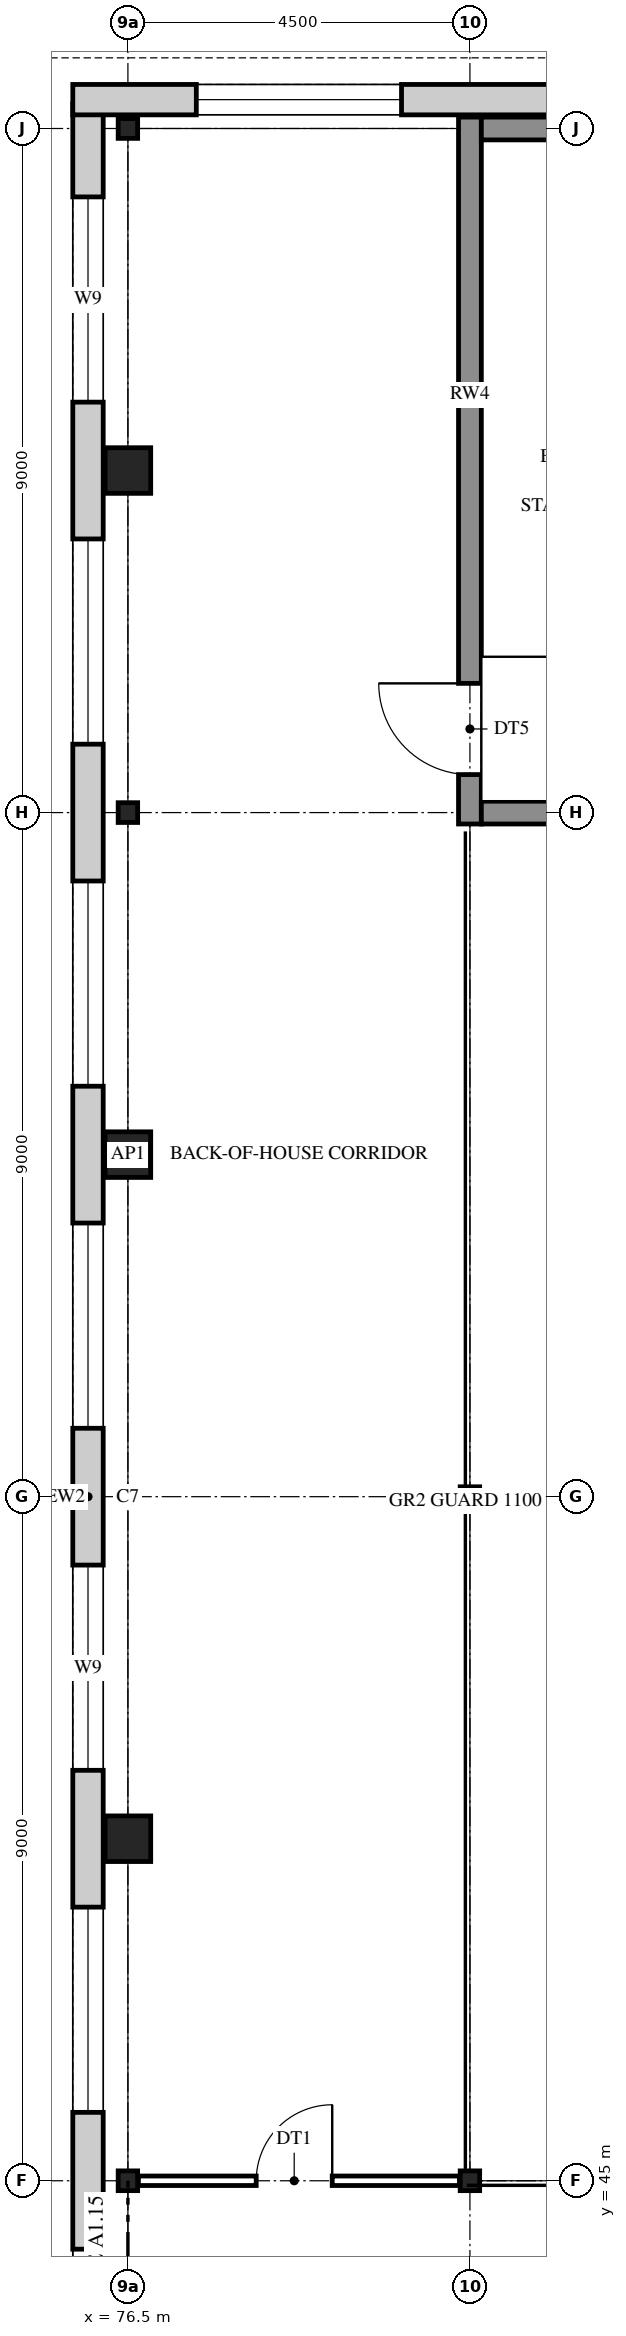
"""IFC4 building model, lengths in metres.
Left out: names, types, materials, properties, quantities, classifications, styles, units other than length and angle.
Written with IfcOpenShell. Run it as: python <this file> out.ifc"""

import sys

from ifc_helpers import new_model, si_unit, direction, frame, frame_2d, origin, origin_2d, place, context, subcontext, project, spatial, rectangle, i_section, extrude, element, fill, save


model = new_model("IFC4")
c1 = context("Model", 3, precision=1e-05, world=origin(), true_north=direction((0.0, 1.0)))
c2 = subcontext(c1, "Body", "Model", "MODEL_VIEW")
j1 = project(units=[si_unit("LENGTHUNIT", "METRE"), si_unit("PLANEANGLEUNIT", "RADIAN")], contexts=[c1])
p1 = place(None, origin())
s1 = spatial("IfcSite", under=j1, at=p1, CompositionType="ELEMENT")
p2 = place(p1, origin())
s2 = spatial("IfcBuilding", under=s1, at=p2, CompositionType="ELEMENT")
p3 = place(p2, frame((0.0, 0.0, 10.5)))
s3 = spatial("IfcBuildingStorey", under=s2, at=p3, CompositionType="ELEMENT", Elevation=10.5)
for number, where, z_axis, x_axis in (
    (1, (76.5, 45.0, 0.0), (0.0, 0.0, 1.0), (1.0, 0.0, 0.0)),
    (2, (76.5, 54.0, 0.0), (0.0, 0.0, 1.0), (1.0, 0.0, 0.0)),
    (3, (76.5, 63.0, 0.0), (0.0, 0.0, 1.0), (1.0, 0.0, 0.0)),
    (4, (76.5, 72.0, 0.0), (0.0, 0.0, 1.0), (1.0, 0.0, 0.0)),
    (5, (81.0, 45.0, 0.0), (0.0, 0.0, 1.0), (1.0, 0.0, 0.0)),
    (6, (81.0, 54.0, 0.0), (0.0, 0.0, 1.0), (1.0, 0.0, 0.0)),
):
    element("IfcColumn", number, at=place(p3, frame(where, z_axis=z_axis, x_axis=x_axis)), inside=s3, PredefinedType="COLUMN", context=c2, shape_type="SweptSolid", body=[
        extrude(i_section(OverallWidth=0.256, OverallDepth=0.26, WebThickness=0.01, FlangeThickness=0.017, FilletRadius=0.014, at=origin_2d()), origin(), (0.0, 0.0, 1.0), 4.5),
    ])
p4 = place(p3, frame((81.0, 62.85, 0.0), z_axis=(0.0, 0.0, 1.0), x_axis=(0.0, 1.0, 0.0)))
e7 = element("IfcWall", 7, at=p4, inside=s3, PredefinedType="SHEAR", context=c2, shape_type="SweptSolid", body=[
    extrude(rectangle(XDim=9.3, YDim=0.3, at=frame_2d((4.65, 0.0))), origin(), (0.0, 0.0, 1.0), 4.5),
])
p5 = place(p4, frame((0.65, 0.0, 0.0)))
e8 = element("IfcOpeningElement", 8, at=p5, cuts=e7, PredefinedType="OPENING", context=c2, shape_type="SweptSolid", body=[
    extrude(rectangle(XDim=1.2, YDim=2.1, at=frame_2d((0.6, 1.05))), frame((0.0, 0.16, 0.0), z_axis=(0.0, -1.0, 0.0), x_axis=(1.0, 0.0, 0.0)), (0.0, 0.0, 1.0), 0.32),
])
for number, where, z_axis, x_axis in (
    (9, (81.15, 63.0, 0.0), (0.0, 0.0, 1.0), (1.0, 0.0, 0.0)),
    (10, (81.15, 72.0, 0.0), (0.0, 0.0, 1.0), (1.0, 0.0, 0.0)),
):
    element("IfcWall", number, at=place(p3, frame(where, z_axis=z_axis, x_axis=x_axis)), inside=s3, PredefinedType="SHEAR", context=c2, shape_type="SweptSolid", body=[
        extrude(rectangle(XDim=4.2, YDim=0.3, at=frame_2d((2.1, 0.0))), origin(), (0.0, 0.0, 1.0), 4.5),
    ])
for number, where, z_axis, x_axis in (
    (11, (76.5, 49.5, 0.0), (0.0, 0.0, 1.0), (1.0, 0.0, 0.0)),
    (12, (76.5, 58.5, 0.0), (0.0, 0.0, 1.0), (1.0, 0.0, 0.0)),
    (13, (76.5, 67.5, 0.0), (0.0, 0.0, 1.0), (1.0, 0.0, 0.0)),
):
    element("IfcColumn", number, at=place(p3, frame(where, z_axis=z_axis, x_axis=x_axis)), inside=s3, PredefinedType="COLUMN", context=c2, shape_type="SweptSolid", body=[
        extrude(rectangle(XDim=0.6, YDim=0.6, at=origin_2d()), origin(), (0.0, 0.0, 1.0), 4.5),
    ])
p6 = place(p3, frame((75.975, 35.675, 0.0), z_axis=(0.0, 0.0, 1.0), x_axis=(0.0, 1.0, 0.0)))
e14 = element("IfcWall", 14, at=p6, inside=s3, PredefinedType="STANDARD", context=c2, shape_type="SweptSolid", body=[
    extrude(rectangle(XDim=36.65, YDim=0.4, at=frame_2d((18.325, 0.0))), origin(), (0.0, 0.0, 1.0), 4.5),
])
p7 = place(p6, frame((1.225, 0.0, 0.9)))
e15 = element("IfcOpeningElement", 15, at=p7, cuts=e14, PredefinedType="OPENING", context=c2, shape_type="SweptSolid", body=[
    extrude(rectangle(XDim=2.7, YDim=2.8, at=frame_2d((1.35, 1.4))), frame((0.0, 0.21, 0.0), z_axis=(0.0, -1.0, 0.0), x_axis=(1.0, 0.0, 0.0)), (0.0, 0.0, 1.0), 0.42),
])
p8 = place(p6, frame((5.725, 0.0, 0.9)))
e16 = element("IfcOpeningElement", 16, at=p8, cuts=e14, PredefinedType="OPENING", context=c2, shape_type="SweptSolid", body=[
    extrude(rectangle(XDim=2.7, YDim=2.8, at=frame_2d((1.35, 1.4))), frame((0.0, 0.21, 0.0), z_axis=(0.0, -1.0, 0.0), x_axis=(1.0, 0.0, 0.0)), (0.0, 0.0, 1.0), 0.42),
])
p9 = place(p6, frame((10.225, 0.0, 0.9)))
e17 = element("IfcOpeningElement", 17, at=p9, cuts=e14, PredefinedType="OPENING", context=c2, shape_type="SweptSolid", body=[
    extrude(rectangle(XDim=2.7, YDim=2.8, at=frame_2d((1.35, 1.4))), frame((0.0, 0.21, 0.0), z_axis=(0.0, -1.0, 0.0), x_axis=(1.0, 0.0, 0.0)), (0.0, 0.0, 1.0), 0.42),
])
p10 = place(p6, frame((14.725, 0.0, 0.9)))
e18 = element("IfcOpeningElement", 18, at=p10, cuts=e14, PredefinedType="OPENING", context=c2, shape_type="SweptSolid", body=[
    extrude(rectangle(XDim=2.7, YDim=2.8, at=frame_2d((1.35, 1.4))), frame((0.0, 0.21, 0.0), z_axis=(0.0, -1.0, 0.0), x_axis=(1.0, 0.0, 0.0)), (0.0, 0.0, 1.0), 0.42),
])
p11 = place(p6, frame((19.225, 0.0, 0.9)))
e19 = element("IfcOpeningElement", 19, at=p11, cuts=e14, PredefinedType="OPENING", context=c2, shape_type="SweptSolid", body=[
    extrude(rectangle(XDim=2.7, YDim=2.8, at=frame_2d((1.35, 1.4))), frame((0.0, 0.21, 0.0), z_axis=(0.0, -1.0, 0.0), x_axis=(1.0, 0.0, 0.0)), (0.0, 0.0, 1.0), 0.42),
])
p12 = place(p6, frame((23.725, 0.0, 0.9)))
e20 = element("IfcOpeningElement", 20, at=p12, cuts=e14, PredefinedType="OPENING", context=c2, shape_type="SweptSolid", body=[
    extrude(rectangle(XDim=2.7, YDim=2.8, at=frame_2d((1.35, 1.4))), frame((0.0, 0.21, 0.0), z_axis=(0.0, -1.0, 0.0), x_axis=(1.0, 0.0, 0.0)), (0.0, 0.0, 1.0), 0.42),
])
p13 = place(p6, frame((28.225, 0.0, 0.9)))
e21 = element("IfcOpeningElement", 21, at=p13, cuts=e14, PredefinedType="OPENING", context=c2, shape_type="SweptSolid", body=[
    extrude(rectangle(XDim=2.7, YDim=2.8, at=frame_2d((1.35, 1.4))), frame((0.0, 0.21, 0.0), z_axis=(0.0, -1.0, 0.0), x_axis=(1.0, 0.0, 0.0)), (0.0, 0.0, 1.0), 0.42),
])
p14 = place(p6, frame((32.725, 0.0, 0.9)))
e22 = element("IfcOpeningElement", 22, at=p14, cuts=e14, PredefinedType="OPENING", context=c2, shape_type="SweptSolid", body=[
    extrude(rectangle(XDim=2.7, YDim=2.8, at=frame_2d((1.35, 1.4))), frame((0.0, 0.21, 0.0), z_axis=(0.0, -1.0, 0.0), x_axis=(1.0, 0.0, 0.0)), (0.0, 0.0, 1.0), 0.42),
])
p15 = place(p3, frame((75.775, 72.379, 0.0), z_axis=(0.0, 0.0, 1.0), x_axis=(1.0, 0.0, 0.0)))
e23 = element("IfcWall", 23, at=p15, inside=s3, PredefinedType="STANDARD", context=c2, shape_type="SweptSolid", body=[
    extrude(rectangle(XDim=14.225, YDim=0.4, at=frame_2d((7.113, 0.0))), origin(), (0.0, 0.0, 1.0), 4.5),
])
p16 = place(p15, frame((1.625, 0.0, 0.9)))
e24 = element("IfcOpeningElement", 24, at=p16, cuts=e23, PredefinedType="OPENING", context=c2, shape_type="SweptSolid", body=[
    extrude(rectangle(XDim=2.7, YDim=2.8, at=frame_2d((1.35, 1.4))), frame((0.0, 0.21, 0.0), z_axis=(0.0, -1.0, 0.0), x_axis=(1.0, 0.0, 0.0)), (0.0, 0.0, 1.0), 0.42),
])
p17 = place(p3, frame((76.638, 45.0, 0.0), z_axis=(0.0, 0.0, 1.0), x_axis=(1.0, 0.0, 0.0)))
e25 = element("IfcWall", 25, at=p17, inside=s3, PredefinedType="PARTITIONING", context=c2, shape_type="SweptSolid", body=[
    extrude(rectangle(XDim=4.224, YDim=0.125, at=frame_2d((2.112, 0.0))), origin(), (0.0, 0.0, 1.0), 3.822),
])
p18 = place(p17, frame((1.55, 0.0, 0.0)))
e26 = element("IfcOpeningElement", 26, at=p18, cuts=e25, PredefinedType="OPENING", context=c2, shape_type="SweptSolid", body=[
    extrude(rectangle(XDim=1.0, YDim=2.1, at=frame_2d((0.5, 1.05))), frame((0.0, 0.073, 0.0), z_axis=(0.0, -1.0, 0.0), x_axis=(1.0, 0.0, 0.0)), (0.0, 0.0, 1.0), 0.145),
])
p19 = place(p8, origin())
e27 = element("IfcWindow", 27, at=p19, inside=s3, PartitioningType="SINGLE_PANEL", PredefinedType="WINDOW", context=c2, shape_type="SweptSolid", body=[
    extrude(rectangle(XDim=2.7, YDim=2.8, at=frame_2d((1.35, 1.4))), frame((0.0, 0.03, 0.0), z_axis=(0.0, -1.0, 0.0), x_axis=(1.0, 0.0, 0.0)), (0.0, 0.0, 1.0), 0.06),
])
fill(e16, e27)
p20 = place(p9, origin())
e28 = element("IfcWindow", 28, at=p20, inside=s3, PartitioningType="SINGLE_PANEL", PredefinedType="WINDOW", context=c2, shape_type="SweptSolid", body=[
    extrude(rectangle(XDim=2.7, YDim=2.8, at=frame_2d((1.35, 1.4))), frame((0.0, 0.03, 0.0), z_axis=(0.0, -1.0, 0.0), x_axis=(1.0, 0.0, 0.0)), (0.0, 0.0, 1.0), 0.06),
])
fill(e17, e28)
p21 = place(p10, origin())
e29 = element("IfcWindow", 29, at=p21, inside=s3, PartitioningType="SINGLE_PANEL", PredefinedType="WINDOW", context=c2, shape_type="SweptSolid", body=[
    extrude(rectangle(XDim=2.7, YDim=2.8, at=frame_2d((1.35, 1.4))), frame((0.0, 0.03, 0.0), z_axis=(0.0, -1.0, 0.0), x_axis=(1.0, 0.0, 0.0)), (0.0, 0.0, 1.0), 0.06),
])
fill(e18, e29)
p22 = place(p11, origin())
e30 = element("IfcWindow", 30, at=p22, inside=s3, PartitioningType="SINGLE_PANEL", PredefinedType="WINDOW", context=c2, shape_type="SweptSolid", body=[
    extrude(rectangle(XDim=2.7, YDim=2.8, at=frame_2d((1.35, 1.4))), frame((0.0, 0.03, 0.0), z_axis=(0.0, -1.0, 0.0), x_axis=(1.0, 0.0, 0.0)), (0.0, 0.0, 1.0), 0.06),
])
fill(e19, e30)
p23 = place(p12, origin())
e31 = element("IfcWindow", 31, at=p23, inside=s3, PartitioningType="SINGLE_PANEL", PredefinedType="WINDOW", context=c2, shape_type="SweptSolid", body=[
    extrude(rectangle(XDim=2.7, YDim=2.8, at=frame_2d((1.35, 1.4))), frame((0.0, 0.03, 0.0), z_axis=(0.0, -1.0, 0.0), x_axis=(1.0, 0.0, 0.0)), (0.0, 0.0, 1.0), 0.06),
])
fill(e20, e31)
p24 = place(p13, origin())
e32 = element("IfcWindow", 32, at=p24, inside=s3, PartitioningType="SINGLE_PANEL", PredefinedType="WINDOW", context=c2, shape_type="SweptSolid", body=[
    extrude(rectangle(XDim=2.7, YDim=2.8, at=frame_2d((1.35, 1.4))), frame((0.0, 0.03, 0.0), z_axis=(0.0, -1.0, 0.0), x_axis=(1.0, 0.0, 0.0)), (0.0, 0.0, 1.0), 0.06),
])
fill(e21, e32)
p25 = place(p14, origin())
e33 = element("IfcWindow", 33, at=p25, inside=s3, PartitioningType="SINGLE_PANEL", PredefinedType="WINDOW", context=c2, shape_type="SweptSolid", body=[
    extrude(rectangle(XDim=2.7, YDim=2.8, at=frame_2d((1.35, 1.4))), frame((0.0, 0.03, 0.0), z_axis=(0.0, -1.0, 0.0), x_axis=(1.0, 0.0, 0.0)), (0.0, 0.0, 1.0), 0.06),
])
fill(e22, e33)
p26 = place(p16, origin())
e34 = element("IfcWindow", 34, at=p26, inside=s3, PartitioningType="SINGLE_PANEL", PredefinedType="WINDOW", context=c2, shape_type="SweptSolid", body=[
    extrude(rectangle(XDim=2.7, YDim=2.8, at=frame_2d((1.35, 1.4))), frame((0.0, 0.03, 0.0), z_axis=(0.0, -1.0, 0.0), x_axis=(1.0, 0.0, 0.0)), (0.0, 0.0, 1.0), 0.06),
])
fill(e24, e34)
p27 = place(p18, frame((1.0, 0.0, 0.0), z_axis=(0.0, 0.0, 1.0), x_axis=(-1.0, 0.0, 0.0)))
e35 = element("IfcDoor", 35, at=p27, inside=s3, OperationType="SINGLE_SWING_RIGHT", PredefinedType="DOOR", context=c2, shape_type="SweptSolid", body=[
    extrude(rectangle(XDim=1.0, YDim=2.1, at=frame_2d((0.5, 1.05))), frame((0.0, 0.025, 0.0), z_axis=(0.0, -1.0, 0.0), x_axis=(1.0, 0.0, 0.0)), (0.0, 0.0, 1.0), 0.05),
])
fill(e26, e35)
p28 = place(p5, frame((1.2, 0.0, 0.0), z_axis=(0.0, 0.0, 1.0), x_axis=(-1.0, 0.0, 0.0)))
e36 = element("IfcDoor", 36, at=p28, inside=s3, OperationType="SINGLE_SWING_RIGHT", PredefinedType="DOOR", context=c2, shape_type="SweptSolid", body=[
    extrude(rectangle(XDim=1.2, YDim=2.1, at=frame_2d((0.6, 1.05))), frame((0.0, 0.025, 0.0), z_axis=(0.0, -1.0, 0.0), x_axis=(1.0, 0.0, 0.0)), (0.0, 0.0, 1.0), 0.05),
])
fill(e8, e36)
save(model, sys.argv[1])
